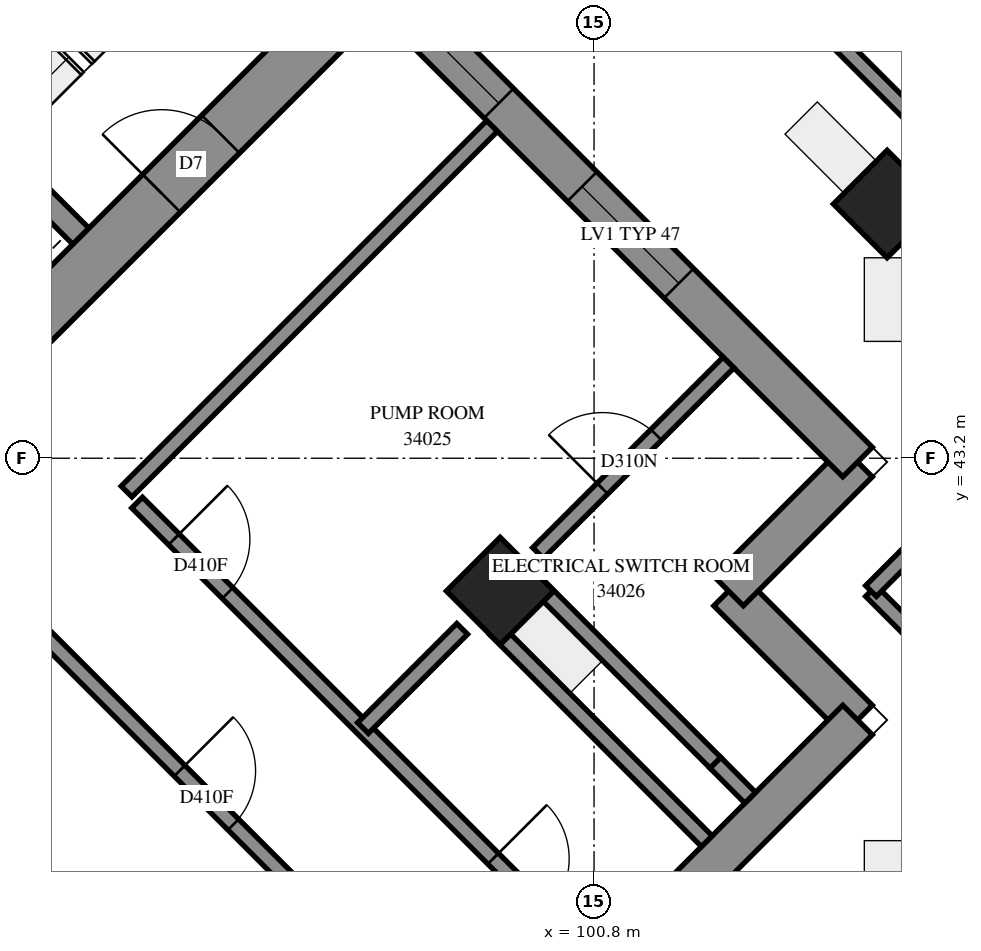
"""IFC4 building model, lengths in metres.
Left out: names, types, materials, properties, quantities, classifications, styles, units other than length and angle.
Written with IfcOpenShell. Run it as: python <this file> out.ifc"""

import sys

from ifc_helpers import new_model, si_unit, direction, frame, frame_2d, origin, origin_2d, place, context, subcontext, project, spatial, polyline, rectangle, outline, extrude, element, fill, save


model = new_model("IFC4")
c1 = context("Model", 3, precision=1e-05, world=origin(), true_north=direction((0.0, 1.0)))
c2 = subcontext(c1, "Body", "Model", "MODEL_VIEW")
j1 = project(units=[si_unit("LENGTHUNIT", "METRE"), si_unit("PLANEANGLEUNIT", "RADIAN")], contexts=[c1])
p1 = place(None, origin())
s1 = spatial("IfcSite", under=j1, at=p1, CompositionType="ELEMENT")
p2 = place(p1, origin())
s2 = spatial("IfcBuilding", under=s1, at=p2, CompositionType="ELEMENT")
p3 = place(p2, frame((0.0, 0.0, 126.2)))
s3 = spatial("IfcBuildingStorey", under=s2, at=p3, CompositionType="ELEMENT", Elevation=126.2)
p4 = place(p3, frame((104.656, 46.544, -0.3), z_axis=(0.0, 0.0, 1.0), x_axis=(0.7071067812, -0.7071067812, 0.0)))
e1 = element("IfcColumn", 1, at=p4, inside=s3, PredefinedType="COLUMN", context=c2, shape_type="SweptSolid", body=[
    extrude(rectangle(XDim=1.0, YDim=1.0, at=origin_2d()), origin(), (0.0, 0.0, 1.0), 5.0),
])
p5 = place(p3, frame((99.565, 41.453, 0.0), z_axis=(0.0, 0.0, 1.0), x_axis=(0.7071067812, -0.7071067812, 0.0)))
e2 = element("IfcColumn", 2, at=p5, inside=s3, PredefinedType="COLUMN", context=c2, shape_type="SweptSolid", body=[
    extrude(rectangle(XDim=1.0, YDim=1.0, at=origin_2d()), origin(), (0.0, 0.0, 1.0), 4.7),
])
p6 = place(p3, frame((87.084, 38.66, -0.3), z_axis=(0.0, 0.0, 1.0), x_axis=(0.7071067812, 0.7071067812, 0.0)))
e3 = element("IfcWall", 3, at=p6, inside=s3, PredefinedType="SHEAR", context=c2, shape_type="SweptSolid", body=[
    extrude(rectangle(XDim=14.4, YDim=0.7, at=frame_2d((7.2, 0.0))), origin(), (0.0, 0.0, 1.0), 4.3),
])
p7 = place(p6, frame((4.55, 0.0, 0.3)))
e4 = element("IfcOpeningElement", 4, at=p7, cuts=e3, PredefinedType="OPENING", context=c2, shape_type="SweptSolid", body=[
    extrude(rectangle(XDim=1.1, YDim=2.1, at=frame_2d((0.55, 1.05))), frame((0.0, 0.36, 0.0), z_axis=(0.0, -1.0, 0.0), x_axis=(1.0, 0.0, 0.0)), (0.0, 0.0, 1.0), 0.72),
])
p8 = place(p6, frame((11.35, 0.0, 0.3)))
e5 = element("IfcOpeningElement", 5, at=p8, cuts=e3, PredefinedType="OPENING", context=c2, shape_type="SweptSolid", body=[
    extrude(rectangle(XDim=1.1, YDim=2.1, at=frame_2d((0.55, 1.05))), frame((0.0, 0.36, 0.0), z_axis=(0.0, -1.0, 0.0), x_axis=(1.0, 0.0, 0.0)), (0.0, 0.0, 1.0), 0.72),
])
p9 = place(p3, frame((88.958, 51.211, 0.0), z_axis=(0.0, 0.0, 1.0), x_axis=(0.7070998367, -0.7071137256, 0.0)))
e6 = element("IfcWall", 6, at=p9, inside=s3, PredefinedType="SOLIDWALL", context=c2, shape_type="SweptSolid", body=[
    extrude(rectangle(XDim=7.2, YDim=0.3, at=frame_2d((3.6, 0.0))), origin(), (0.0, 0.0, 1.0), 4.7),
])
p10 = place(p3, frame((104.267, 39.756, 0.0), z_axis=(0.0, 0.0, 1.0), x_axis=(-0.7070859475, 0.7071276143, 0.0)))
e7 = element("IfcWall", 7, at=p10, inside=s3, PredefinedType="SOLIDWALL", context=c2, shape_type="SweptSolid", body=[
    extrude(outline(polyline([(-0.275, -0.275), (2.125, -0.275), (2.675, 0.275), (0.275, 0.275), (-0.275, -0.275)])), origin(), (0.0, 0.0, 1.0), 4.7),
])
p11 = place(p3, frame((102.57, 41.453, 0.0), z_axis=(0.0, 0.0, 1.0), x_axis=(0.7071067812, 0.7071067812, 0.0)))
e8 = element("IfcWall", 8, at=p11, inside=s3, PredefinedType="SOLIDWALL", context=c2, shape_type="SweptSolid", body=[
    extrude(outline(polyline([(0.275, -0.275), (2.675, -0.275), (2.125, 0.275), (-0.275, 0.275), (0.275, -0.275)])), origin(), (0.0, 0.0, 1.0), 4.7),
])
p12 = place(p3, frame((104.267, 43.15, 0.0), z_axis=(0.0, 0.0, 1.0), x_axis=(-0.7071054305, 0.7071081319, 0.0)))
e9 = element("IfcWall", 9, at=p12, inside=s3, PredefinedType="SOLIDWALL", context=c2, shape_type="SweptSolid", body=[
    extrude(outline(polyline([(-0.275, -0.275), (37.131, -0.275), (36.903, 0.275), (0.275, 0.275), (-0.275, -0.275)])), origin(), (0.0, 0.0, 1.0), 4.7),
])
p13 = place(p12, frame((3.325, 0.0, 0.9)))
e10 = element("IfcOpeningElement", 10, at=p13, cuts=e9, PredefinedType="OPENING", context=c2, shape_type="SweptSolid", body=[
    extrude(rectangle(XDim=1.8, YDim=2.4, at=frame_2d((0.9, 1.2))), frame((0.0, 0.285, 0.0), z_axis=(0.0, -1.0, 0.0), x_axis=(1.0, 0.0, 0.0)), (0.0, 0.0, 1.0), 0.57),
])
p14 = place(p12, frame((6.675, 0.0, 0.9)))
e11 = element("IfcOpeningElement", 11, at=p14, cuts=e9, PredefinedType="OPENING", context=c2, shape_type="SweptSolid", body=[
    extrude(rectangle(XDim=1.8, YDim=2.4, at=frame_2d((0.9, 1.2))), frame((0.0, 0.285, 0.0), z_axis=(0.0, -1.0, 0.0), x_axis=(1.0, 0.0, 0.0)), (0.0, 0.0, 1.0), 0.57),
])
p15 = place(p12, frame((24.625, 0.0, 0.9)))
e12 = element("IfcOpeningElement", 12, at=p15, cuts=e9, PredefinedType="OPENING", context=c2, shape_type="SweptSolid", body=[
    extrude(rectangle(XDim=1.8, YDim=2.4, at=frame_2d((0.9, 1.2))), frame((0.0, 0.285, 0.0), z_axis=(0.0, -1.0, 0.0), x_axis=(1.0, 0.0, 0.0)), (0.0, 0.0, 1.0), 0.57),
])
p16 = place(p12, frame((28.225, 0.0, 0.9)))
e13 = element("IfcOpeningElement", 13, at=p16, cuts=e9, PredefinedType="OPENING", context=c2, shape_type="SweptSolid", body=[
    extrude(rectangle(XDim=1.8, YDim=2.4, at=frame_2d((0.9, 1.2))), frame((0.0, 0.285, 0.0), z_axis=(0.0, -1.0, 0.0), x_axis=(1.0, 0.0, 0.0)), (0.0, 0.0, 1.0), 0.57),
])
p17 = place(p12, frame((31.825, 0.0, 0.9)))
e14 = element("IfcOpeningElement", 14, at=p17, cuts=e9, PredefinedType="OPENING", context=c2, shape_type="SweptSolid", body=[
    extrude(rectangle(XDim=1.8, YDim=2.4, at=frame_2d((0.9, 1.2))), frame((0.0, 0.285, 0.0), z_axis=(0.0, -1.0, 0.0), x_axis=(1.0, 0.0, 0.0)), (0.0, 0.0, 1.0), 0.57),
])
p18 = place(p12, frame((34.714, 0.0, 0.9)))
e15 = element("IfcOpeningElement", 15, at=p18, cuts=e9, PredefinedType="OPENING", context=c2, shape_type="SweptSolid", body=[
    extrude(rectangle(XDim=1.8, YDim=2.4, at=frame_2d((0.9, 1.2))), frame((0.0, 0.285, 0.0), z_axis=(0.0, -1.0, 0.0), x_axis=(1.0, 0.0, 0.0)), (0.0, 0.0, 1.0), 0.57),
])
p19 = place(p3, frame((78.561, 45.875, 0.0), z_axis=(0.0, 0.0, 1.0), x_axis=(0.7071067812, -0.7071067812, 0.0)))
e16 = element("IfcWall", 16, at=p19, inside=s3, PredefinedType="SOLIDWALL", context=c2, shape_type="SweptSolid", body=[
    extrude(outline(polyline([(0.114, -0.275), (22.779, -0.275), (22.229, 0.275), (-0.114, 0.275), (0.114, -0.275)])), origin(), (0.0, 0.0, 1.0), 4.7),
])
p20 = place(p19, frame((11.679, 0.0, 0.9)))
e17 = element("IfcOpeningElement", 17, at=p20, cuts=e16, PredefinedType="OPENING", context=c2, shape_type="SweptSolid", body=[
    extrude(rectangle(XDim=1.8, YDim=2.4, at=frame_2d((0.9, 1.2))), frame((0.0, 0.285, 0.0), z_axis=(0.0, -1.0, 0.0), x_axis=(1.0, 0.0, 0.0)), (0.0, 0.0, 1.0), 0.57),
])
p21 = place(p19, frame((15.279, 0.0, 0.9)))
e18 = element("IfcOpeningElement", 18, at=p21, cuts=e16, PredefinedType="OPENING", context=c2, shape_type="SweptSolid", body=[
    extrude(rectangle(XDim=1.8, YDim=2.4, at=frame_2d((0.9, 1.2))), frame((0.0, 0.285, 0.0), z_axis=(0.0, -1.0, 0.0), x_axis=(1.0, 0.0, 0.0)), (0.0, 0.0, 1.0), 0.57),
])
p22 = place(p19, frame((18.879, 0.0, 0.9)))
e19 = element("IfcOpeningElement", 19, at=p22, cuts=e16, PredefinedType="OPENING", context=c2, shape_type="SweptSolid", body=[
    extrude(rectangle(XDim=1.8, YDim=2.4, at=frame_2d((0.9, 1.2))), frame((0.0, 0.285, 0.0), z_axis=(0.0, -1.0, 0.0), x_axis=(1.0, 0.0, 0.0)), (0.0, 0.0, 1.0), 0.57),
])
p23 = place(p3, frame((94.474, 29.962, 0.0), z_axis=(0.0, 0.0, 1.0), x_axis=(0.7071067812, 0.7071067812, 0.0)))
e20 = element("IfcWall", 20, at=p23, inside=s3, PredefinedType="SOLIDWALL", context=c2, shape_type="SweptSolid", body=[
    extrude(outline(polyline([(-0.275, -0.275), (14.125, -0.275), (13.575, 0.275), (0.275, 0.275), (-0.275, -0.275)])), origin(), (0.0, 0.0, 1.0), 4.7),
])
p24 = place(p23, frame((1.825, 0.0, 0.9)))
e21 = element("IfcOpeningElement", 21, at=p24, cuts=e20, PredefinedType="OPENING", context=c2, shape_type="SweptSolid", body=[
    extrude(rectangle(XDim=1.8, YDim=2.4, at=frame_2d((0.9, 1.2))), frame((0.0, 0.285, 0.0), z_axis=(0.0, -1.0, 0.0), x_axis=(1.0, 0.0, 0.0)), (0.0, 0.0, 1.0), 0.57),
])
p25 = place(p23, frame((5.125, 0.0, 0.9)))
e22 = element("IfcOpeningElement", 22, at=p25, cuts=e20, PredefinedType="OPENING", context=c2, shape_type="SweptSolid", body=[
    extrude(rectangle(XDim=1.8, YDim=2.4, at=frame_2d((0.9, 1.2))), frame((0.0, 0.285, 0.0), z_axis=(0.0, -1.0, 0.0), x_axis=(1.0, 0.0, 0.0)), (0.0, 0.0, 1.0), 0.57),
])
p26 = place(p23, frame((9.302, 0.0, 0.7)))
e23 = element("IfcOpeningElement", 23, at=p26, cuts=e20, PredefinedType="OPENING", context=c2, shape_type="SweptSolid", body=[
    extrude(rectangle(XDim=1.2, YDim=2.3, at=frame_2d((0.6, 1.15))), frame((0.0, 0.285, 0.0), z_axis=(0.0, -1.0, 0.0), x_axis=(1.0, 0.0, 0.0)), (0.0, 0.0, 1.0), 0.57),
])
p27 = place(p3, frame((107.838, 38.059, 0.0), z_axis=(0.0, 0.0, 1.0), x_axis=(-0.7071067812, 0.7071067812, 0.0)))
e24 = element("IfcWall", 24, at=p27, inside=s3, PredefinedType="SOLIDWALL", context=c2, shape_type="SweptSolid", body=[
    extrude(outline(polyline([(-0.1, -0.1), (4.7, -0.1), (4.9, 0.1), (0.1, 0.1), (-0.1, -0.1)])), origin(), (0.0, 0.0, 1.0), 4.7),
])
p28 = place(p3, frame((104.444, 41.453, 0.0), z_axis=(0.0, 0.0, 1.0), x_axis=(0.7071067812, 0.7071067812, 0.0)))
e25 = element("IfcWall", 25, at=p28, inside=s3, PredefinedType="SOLIDWALL", context=c2, shape_type="SweptSolid", body=[
    extrude(outline(polyline([(0.1, -0.1), (4.9, -0.1), (4.7, 0.1), (-0.1, 0.1), (0.1, -0.1)])), origin(), (0.0, 0.0, 1.0), 4.7),
])
p29 = place(p3, frame((107.838, 44.847, 0.0), z_axis=(0.0, 0.0, 1.0), x_axis=(-0.7071067812, 0.7071067812, 0.0)))
e26 = element("IfcWall", 26, at=p29, inside=s3, PredefinedType="SOLIDWALL", context=c2, shape_type="SweptSolid", body=[
    extrude(outline(polyline([(-0.1, -0.1), (39.926, -0.1), (39.843, 0.1), (0.1, 0.1), (-0.1, -0.1)])), origin(), (0.0, 0.0, 1.0), 4.7),
])
p30 = place(p3, frame((77.018, 42.15, 0.0), z_axis=(0.0, 0.0, 1.0), x_axis=(0.7071067812, -0.7071067812, 0.0)))
e27 = element("IfcWall", 27, at=p30, inside=s3, PredefinedType="SOLIDWALL", context=c2, shape_type="SweptSolid", body=[
    extrude(outline(polyline([(0.041, -0.1), (24.786, -0.1), (24.586, 0.1), (-0.041, 0.1), (0.041, -0.1)])), origin(), (0.0, 0.0, 1.0), 4.7),
])
p31 = place(p3, frame((94.474, 24.695, 0.0), z_axis=(0.0, 0.0, 1.0), x_axis=(0.7071067812, 0.7071067812, 0.0)))
e28 = element("IfcWall", 28, at=p31, inside=s3, PredefinedType="SOLIDWALL", context=c2, shape_type="SweptSolid", body=[
    extrude(outline(polyline([(-0.1, -0.1), (19.0, -0.1), (18.8, 0.1), (0.1, 0.1), (-0.1, -0.1)])), origin(), (0.0, 0.0, 1.0), 4.7),
])
p32 = place(p3, frame((93.163, 41.273, 0.0), z_axis=(0.0, 0.0, 1.0), x_axis=(0.7071010004, -0.7071125619, 0.0)))
e29 = element("IfcWall", 29, at=p32, inside=s3, PredefinedType="PARTITIONING", context=c2, shape_type="SweptSolid", body=[
    extrude(rectangle(XDim=8.649, YDim=0.2, at=frame_2d((4.325, 0.0))), origin(), (0.0, 0.0, 1.0), 4.7),
])
p33 = place(p32, frame((3.09, 0.0, 0.0)))
e30 = element("IfcOpeningElement", 30, at=p33, cuts=e29, PredefinedType="OPENING", context=c2, shape_type="SweptSolid", body=[
    extrude(rectangle(XDim=1.0, YDim=2.1, at=frame_2d((0.5, 1.05))), frame((0.0, 0.11, 0.0), z_axis=(0.0, -1.0, 0.0), x_axis=(1.0, 0.0, 0.0)), (0.0, 0.0, 1.0), 0.22),
])
p34 = place(p3, frame((94.788, 42.617, 0.0), z_axis=(0.0, 0.0, 1.0), x_axis=(0.7071067812, -0.7071067812, 0.0)))
e31 = element("IfcWall", 31, at=p34, inside=s3, PredefinedType="PARTITIONING", context=c2, shape_type="SweptSolid", body=[
    extrude(rectangle(XDim=7.801, YDim=0.2, at=frame_2d((3.9, 0.0))), origin(), (0.0, 0.0, 1.0), 4.7),
])
p35 = place(p34, frame((0.684, 0.0, 0.0)))
e32 = element("IfcOpeningElement", 32, at=p35, cuts=e31, PredefinedType="OPENING", context=c2, shape_type="SweptSolid", body=[
    extrude(rectangle(XDim=1.0, YDim=2.1, at=frame_2d((0.5, 1.05))), frame((0.0, 0.11, 0.0), z_axis=(0.0, -1.0, 0.0), x_axis=(1.0, 0.0, 0.0)), (0.0, 0.0, 1.0), 0.22),
])
p36 = place(p34, frame((6.625, 0.0, 0.0)))
e33 = element("IfcOpeningElement", 33, at=p36, cuts=e31, PredefinedType="OPENING", context=c2, shape_type="SweptSolid", body=[
    extrude(rectangle(XDim=1.0, YDim=2.1, at=frame_2d((0.5, 1.05))), frame((0.0, 0.11, 0.0), z_axis=(0.0, -1.0, 0.0), x_axis=(1.0, 0.0, 0.0)), (0.0, 0.0, 1.0), 0.22),
])
p37 = place(p3, frame((94.65, 42.762, 0.0), z_axis=(0.0, 0.0, 1.0), x_axis=(0.7071067812, 0.7071067812, 0.0)))
e34 = element("IfcWall", 34, at=p37, inside=s3, PredefinedType="PARTITIONING", context=c2, shape_type="SweptSolid", body=[
    extrude(rectangle(XDim=6.8, YDim=0.2, at=frame_2d((3.4, 0.0))), origin(), (0.0, 0.0, 1.0), 4.7),
])
p38 = place(p3, frame((99.497, 40.951, 0.0), z_axis=(0.0, 0.0, 1.0), x_axis=(0.7066881835, -0.7075251312, 0.0)))
e35 = element("IfcWall", 35, at=p38, inside=s3, PredefinedType="PARTITIONING", context=c2, shape_type="SweptSolid", body=[
    extrude(rectangle(XDim=3.943, YDim=0.2, at=frame_2d((1.971, 0.0))), origin(), (0.0, 0.0, 1.0), 4.7),
])
p39 = place(p3, frame((100.063, 41.953, 0.0), z_axis=(0.0, 0.0, 1.0), x_axis=(0.7071067812, 0.7071067812, 0.0)))
e36 = element("IfcWall", 36, at=p39, inside=s3, PredefinedType="PARTITIONING", context=c2, shape_type="SweptSolid", body=[
    extrude(rectangle(XDim=3.544, YDim=0.2, at=frame_2d((1.772, 0.0))), origin(), (0.0, 0.0, 1.0), 4.7),
])
p40 = place(p39, frame((1.199, 0.0, 0.0)))
e37 = element("IfcOpeningElement", 37, at=p40, cuts=e36, PredefinedType="OPENING", context=c2, shape_type="SweptSolid", body=[
    extrude(rectangle(XDim=1.0, YDim=2.1, at=frame_2d((0.5, 1.05))), frame((0.0, 0.11, 0.0), z_axis=(0.0, -1.0, 0.0), x_axis=(1.0, 0.0, 0.0)), (0.0, 0.0, 1.0), 0.22),
])
p41 = place(p3, frame((100.067, 41.523, 0.0), z_axis=(0.0, 0.0, 1.0), x_axis=(0.7071067812, -0.7071067812, 0.0)))
e38 = element("IfcWall", 38, at=p41, inside=s3, PredefinedType="PARTITIONING", context=c2, shape_type="SweptSolid", body=[
    extrude(rectangle(XDim=3.295, YDim=0.2, at=frame_2d((1.648, 0.0))), origin(), (0.0, 0.0, 1.0), 4.7),
])
p42 = place(p3, frame((97.761, 39.651, 0.0), z_axis=(0.0, 0.0, 1.0), x_axis=(0.7071067812, 0.7071067812, 0.0)))
e39 = element("IfcWall", 39, at=p42, inside=s3, PredefinedType="PARTITIONING", context=c2, shape_type="SweptSolid", body=[
    extrude(rectangle(XDim=1.844, YDim=0.2, at=frame_2d((0.922, 0.0))), origin(), (0.0, 0.0, 1.0), 4.7),
])
p43 = place(p3, frame((102.397, 39.193, 0.0), z_axis=(0.0, 0.0, 1.0), x_axis=(0.7053331426, -0.7088759821, 0.0)))
e40 = element("IfcWall", 40, at=p43, inside=s3, PredefinedType="PARTITIONING", context=c2, shape_type="SweptSolid", body=[
    extrude(rectangle(XDim=0.649, YDim=0.2, at=frame_2d((0.325, 0.0))), origin(), (0.0, 0.0, 1.0), 4.7),
])
p44 = place(p13, origin())
e41 = element("IfcWindow", 41, at=p44, inside=s3, PartitioningType="SINGLE_PANEL", PredefinedType="WINDOW", context=c2, shape_type="SweptSolid", body=[
    extrude(rectangle(XDim=1.8, YDim=2.4, at=frame_2d((0.9, 1.2))), frame((0.0, 0.155, 0.0), z_axis=(0.0, -1.0, 0.0), x_axis=(1.0, 0.0, 0.0)), (0.0, 0.0, 1.0), 0.06),
])
fill(e10, e41)
p45 = place(p14, origin())
e42 = element("IfcWindow", 42, at=p45, inside=s3, PartitioningType="SINGLE_PANEL", PredefinedType="WINDOW", context=c2, shape_type="SweptSolid", body=[
    extrude(rectangle(XDim=1.8, YDim=2.4, at=frame_2d((0.9, 1.2))), frame((0.0, 0.155, 0.0), z_axis=(0.0, -1.0, 0.0), x_axis=(1.0, 0.0, 0.0)), (0.0, 0.0, 1.0), 0.06),
])
fill(e11, e42)
p46 = place(p8, origin())
e43 = element("IfcDoor", 43, at=p46, inside=s3, OperationType="SINGLE_SWING_RIGHT", PredefinedType="DOOR", context=c2, shape_type="SweptSolid", body=[
    extrude(rectangle(XDim=1.1, YDim=2.1, at=frame_2d((0.55, 1.05))), frame((0.0, 0.025, 0.0), z_axis=(0.0, -1.0, 0.0), x_axis=(1.0, 0.0, 0.0)), (0.0, 0.0, 1.0), 0.05),
])
fill(e5, e43)
p47 = place(p35, origin())
e44 = element("IfcDoor", 44, at=p47, inside=s3, OperationType="SINGLE_SWING_RIGHT", PredefinedType="DOOR", context=c2, shape_type="SweptSolid", body=[
    extrude(rectangle(XDim=1.0, YDim=2.1, at=frame_2d((0.5, 1.05))), frame((0.0, 0.025, 0.0), z_axis=(0.0, -1.0, 0.0), x_axis=(1.0, 0.0, 0.0)), (0.0, 0.0, 1.0), 0.05),
])
fill(e32, e44)
p48 = place(p36, origin())
e45 = element("IfcDoor", 45, at=p48, inside=s3, OperationType="SINGLE_SWING_LEFT", PredefinedType="DOOR", context=c2, shape_type="SweptSolid", body=[
    extrude(rectangle(XDim=1.0, YDim=2.1, at=frame_2d((0.5, 1.05))), frame((0.0, 0.025, 0.0), z_axis=(0.0, -1.0, 0.0), x_axis=(1.0, 0.0, 0.0)), (0.0, 0.0, 1.0), 0.05),
])
fill(e33, e45)
p49 = place(p33, origin())
e46 = element("IfcDoor", 46, at=p49, inside=s3, OperationType="SINGLE_SWING_LEFT", PredefinedType="DOOR", context=c2, shape_type="SweptSolid", body=[
    extrude(rectangle(XDim=1.0, YDim=2.1, at=frame_2d((0.5, 1.05))), frame((0.0, 0.025, 0.0), z_axis=(0.0, -1.0, 0.0), x_axis=(1.0, 0.0, 0.0)), (0.0, 0.0, 1.0), 0.05),
])
fill(e30, e46)
p50 = place(p40, origin())
e47 = element("IfcDoor", 47, at=p50, inside=s3, OperationType="SINGLE_SWING_LEFT", PredefinedType="DOOR", context=c2, shape_type="SweptSolid", body=[
    extrude(rectangle(XDim=1.0, YDim=2.1, at=frame_2d((0.5, 1.05))), frame((0.0, 0.025, 0.0), z_axis=(0.0, -1.0, 0.0), x_axis=(1.0, 0.0, 0.0)), (0.0, 0.0, 1.0), 0.05),
])
fill(e37, e47)
save(model, sys.argv[1])
